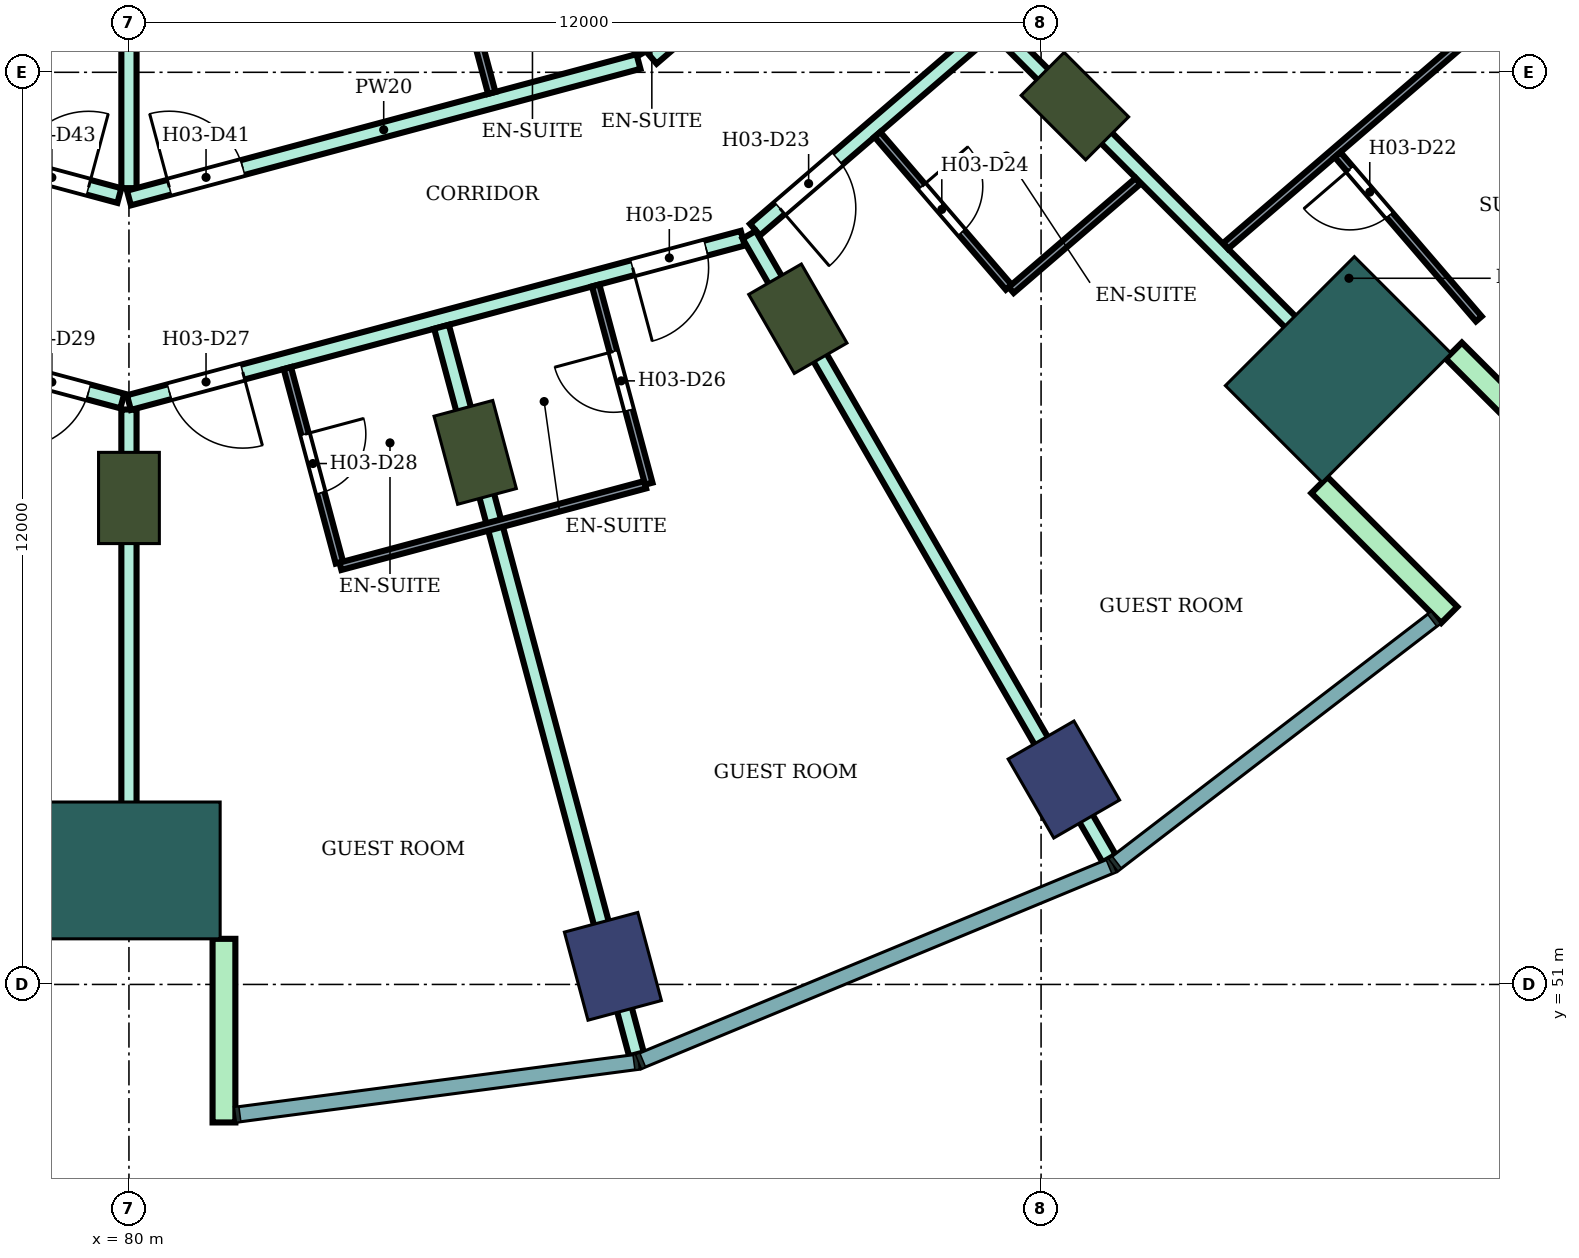
"""IFC4 building model, lengths in metres.
Left out: names, types, materials, properties, quantities, classifications, styles, units other than length and angle.
Written with IfcOpenShell. Run it as: python <this file> out.ifc"""

import sys

from ifc_helpers import new_model, si_unit, direction, frame, frame_2d, origin, origin_2d, place, context, subcontext, project, spatial, rectangle, extrude, element, fill, save


model = new_model("IFC4")
c1 = context("Model", 3, precision=1e-05, world=origin(), true_north=direction((0.0, 1.0)))
c2 = subcontext(c1, "Body", "Model", "MODEL_VIEW")
j1 = project(units=[si_unit("LENGTHUNIT", "METRE"), si_unit("PLANEANGLEUNIT", "RADIAN")], contexts=[c1])
p1 = place(None, origin())
s1 = spatial("IfcSite", under=j1, at=p1, CompositionType="ELEMENT")
p2 = place(p1, origin())
s2 = spatial("IfcBuilding", under=s1, at=p2, CompositionType="ELEMENT")
p3 = place(p2, frame((0.0, 0.0, 59.2)))
s3 = spatial("IfcBuildingStorey", under=s2, at=p3, CompositionType="ELEMENT", Elevation=59.2)
for number, where, z_axis, x_axis in (
    (1, (86.367, 51.238, 0.0), (0.0, 0.0, 1.0), (0.259, -0.966, 0.0)),
    (2, (92.3, 53.696, 0.0), (0.0, 0.0, 1.0), (0.5, -0.866, 0.0)),
):
    element("IfcColumn", number, at=place(p3, frame(where, z_axis=z_axis, x_axis=x_axis)), inside=s3, PredefinedType="COLUMN", context=c2, shape_type="SweptSolid", body=[
        extrude(rectangle(XDim=1.2, YDim=1.0, at=origin_2d()), origin(), (0.0, 0.0, 1.0), 3.8),
    ])
for number, where, z_axis, x_axis in (
    (3, (80.0, 57.4, 0.0), (0.0, 0.0, 1.0), (0.0, -1.0, 0.0)),
    (4, (84.555, 58.0, 0.0), (0.0, 0.0, 1.0), (0.259, -0.966, 0.0)),
    (5, (88.8, 59.758, 0.0), (0.0, 0.0, 1.0), (0.5, -0.866, 0.0)),
    (6, (92.445, 62.555, 0.0), (0.0, 0.0, 1.0), (0.707, -0.707, 0.0)),
):
    element("IfcColumn", number, at=place(p3, frame(where, z_axis=z_axis, x_axis=x_axis)), inside=s3, PredefinedType="COLUMN", context=c2, shape_type="SweptSolid", body=[
        extrude(rectangle(XDim=1.2, YDim=0.8, at=origin_2d()), origin(), (0.0, 0.0, 1.0), 3.8),
    ])
for number, where, z_axis, x_axis in (
    (7, (80.0, 52.5, 0.0), (0.0, 0.0, 1.0), (0.0, -1.0, 0.0)),
    (8, (95.91, 59.09, 0.0), (0.0, 0.0, 1.0), (0.707, -0.707, 0.0)),
):
    element("IfcColumn", number, at=place(p3, frame(where, z_axis=z_axis, x_axis=x_axis)), inside=s3, PredefinedType="COLUMN", context=c2, shape_type="SweptSolid", body=[
        extrude(rectangle(XDim=1.8, YDim=2.4, at=origin_2d()), origin(), (0.0, 0.0, 1.0), 3.8),
    ])
for number, where, z_axis, x_axis in (
    (9, (81.25, 51.6, 0.0), (0.0, 0.0, 1.0), (0.0, -1.0, 0.0)),
    (10, (95.662, 57.57, 0.0), (0.0, 0.0, 1.0), (0.707, -0.707, 0.0)),
    (11, (97.43, 59.338, 0.0), (0.0, 0.0, 1.0), (0.707, -0.707, 0.0)),
):
    element("IfcWall", number, at=place(p3, frame(where, z_axis=z_axis, x_axis=x_axis)), inside=s3, PredefinedType="NOTDEFINED", context=c2, shape_type="SweptSolid", body=[
        extrude(rectangle(XDim=2.416, YDim=0.3, at=frame_2d((1.208, 0.0))), origin(), (0.0, 0.0, 1.0), 3.8),
    ])
p4 = place(p3, frame((71.877, 60.831, 0.0), z_axis=(0.0, 0.0, 1.0), x_axis=(0.965852509869, -0.259092510851, 0.0)))
e12 = element("IfcWall", 12, at=p4, inside=s3, PredefinedType="PARTITIONING", context=c2, shape_type="SweptSolid", body=[
    extrude(rectangle(XDim=8.32, YDim=0.2, at=frame_2d((4.16, 0.0))), origin(), (0.0, 0.0, 1.0), 3.35),
])
p5 = place(p4, frame((6.86, 0.0, 0.0)))
e13 = element("IfcOpeningElement", 13, at=p5, cuts=e12, PredefinedType="OPENING", context=c2, shape_type="SweptSolid", body=[
    extrude(rectangle(XDim=1.0, YDim=2.1, at=frame_2d((0.5, 1.05))), frame((0.0, 0.11, 0.0), z_axis=(0.0, -1.0, 0.0), x_axis=(1.0, 0.0, 0.0)), (0.0, 0.0, 1.0), 0.22),
])
p6 = place(p4, frame((1.6, 0.0, 0.0)))
e14 = element("IfcOpeningElement", 14, at=p6, cuts=e12, PredefinedType="OPENING", context=c2, shape_type="SweptSolid", body=[
    extrude(rectangle(XDim=1.0, YDim=2.1, at=frame_2d((0.5, 1.05))), frame((0.0, 0.11, 0.0), z_axis=(0.0, -1.0, 0.0), x_axis=(1.0, 0.0, 0.0)), (0.0, 0.0, 1.0), 0.22),
])
p7 = place(p3, frame((73.297, 63.143, 0.0), z_axis=(0.0, 0.0, 1.0), x_axis=(0.965859030528, -0.25906820173, 0.0)))
e15 = element("IfcWall", 15, at=p7, inside=s3, PredefinedType="PARTITIONING", context=c2, shape_type="SweptSolid", body=[
    extrude(rectangle(XDim=6.81, YDim=0.2, at=frame_2d((3.405, 0.0))), origin(), (0.0, 0.0, 1.0), 3.35),
])
p8 = place(p7, frame((5.39, 0.0, 0.0)))
e16 = element("IfcOpeningElement", 16, at=p8, cuts=e15, PredefinedType="OPENING", context=c2, shape_type="SweptSolid", body=[
    extrude(rectangle(XDim=1.0, YDim=2.1, at=frame_2d((0.5, 1.05))), frame((0.0, 0.11, 0.0), z_axis=(0.0, -1.0, 0.0), x_axis=(1.0, 0.0, 0.0)), (0.0, 0.0, 1.0), 0.22),
])
p9 = place(p3, frame((80.0, 51.8, 0.0), z_axis=(0.0, 0.0, 1.0), x_axis=(0.0, 1.0, 0.0)))
e17 = element("IfcWall", 17, at=p9, inside=s3, PredefinedType="PARTITIONING", context=c2, shape_type="SweptSolid", body=[
    extrude(rectangle(XDim=6.764, YDim=0.2, at=frame_2d((3.382, 0.0))), origin(), (0.0, 0.0, 1.0), 3.35),
])
p10 = place(p3, frame((80.0, 58.655, 0.0), z_axis=(0.0, 0.0, 1.0), x_axis=(0.965974635626, 0.258636817424, 0.0)))
e18 = element("IfcWall", 18, at=p10, inside=s3, PredefinedType="PARTITIONING", context=c2, shape_type="SweptSolid", body=[
    extrude(rectangle(XDim=8.36, YDim=0.2, at=frame_2d((4.18, 0.0))), origin(), (0.0, 0.0, 1.0), 3.35),
])
p11 = place(p10, frame((6.86, 0.0, 0.0)))
e19 = element("IfcOpeningElement", 19, at=p11, cuts=e18, PredefinedType="OPENING", context=c2, shape_type="SweptSolid", body=[
    extrude(rectangle(XDim=1.0, YDim=2.1, at=frame_2d((0.5, 1.05))), frame((0.0, 0.11, 0.0), z_axis=(0.0, -1.0, 0.0), x_axis=(1.0, 0.0, 0.0)), (0.0, 0.0, 1.0), 0.22),
])
p12 = place(p10, frame((0.55, 0.0, 0.0)))
e20 = element("IfcOpeningElement", 20, at=p12, cuts=e18, PredefinedType="OPENING", context=c2, shape_type="SweptSolid", body=[
    extrude(rectangle(XDim=1.0, YDim=2.1, at=frame_2d((0.5, 1.05))), frame((0.0, 0.11, 0.0), z_axis=(0.0, -1.0, 0.0), x_axis=(1.0, 0.0, 0.0)), (0.0, 0.0, 1.0), 0.22),
])
p13 = place(p3, frame((80.0, 61.476, 0.0), z_axis=(0.0, 0.0, 1.0), x_axis=(0.0, 1.0, 0.0)))
e21 = element("IfcWall", 21, at=p13, inside=s3, PredefinedType="PARTITIONING", context=c2, shape_type="SweptSolid", body=[
    extrude(rectangle(XDim=5.825, YDim=0.2, at=frame_2d((2.913, 0.0))), origin(), (0.0, 0.0, 1.0), 3.35),
])
p14 = place(p3, frame((80.0, 61.346, 0.0), z_axis=(0.0, 0.0, 1.0), x_axis=(0.965924181808, 0.258825182312, 0.0)))
e22 = element("IfcWall", 22, at=p14, inside=s3, PredefinedType="PARTITIONING", context=c2, shape_type="SweptSolid", body=[
    extrude(rectangle(XDim=6.94, YDim=0.2, at=frame_2d((3.47, 0.0))), origin(), (0.0, 0.0, 1.0), 3.35),
])
p15 = place(p14, frame((0.55, 0.0, 0.0)))
e23 = element("IfcOpeningElement", 23, at=p15, cuts=e22, PredefinedType="OPENING", context=c2, shape_type="SweptSolid", body=[
    extrude(rectangle(XDim=1.0, YDim=2.1, at=frame_2d((0.5, 1.05))), frame((0.0, 0.11, 0.0), z_axis=(0.0, -1.0, 0.0), x_axis=(1.0, 0.0, 0.0)), (0.0, 0.0, 1.0), 0.22),
])
p16 = place(p3, frame((83.848, 68.332, 0.0), z_axis=(0.0, 0.0, 1.0), x_axis=(0.499901724708, -0.866082135617, 0.0)))
e24 = element("IfcWall", 24, at=p16, inside=s3, PredefinedType="PARTITIONING", context=c2, shape_type="SweptSolid", body=[
    extrude(rectangle(XDim=5.855, YDim=0.2, at=frame_2d((2.928, 0.0))), origin(), (0.0, 0.0, 1.0), 3.35),
])
p17 = place(p3, frame((84.112, 59.652, 0.0), z_axis=(0.0, 0.0, 1.0), x_axis=(0.258843225553, -0.965919346832, 0.0)))
e25 = element("IfcWall", 25, at=p17, inside=s3, PredefinedType="PARTITIONING", context=c2, shape_type="SweptSolid", body=[
    extrude(rectangle(XDim=9.909, YDim=0.2, at=frame_2d((4.955, 0.0))), origin(), (0.0, 0.0, 1.0), 3.35),
])
p18 = place(p3, frame((86.877, 63.189, 0.0), z_axis=(0.0, 0.0, 1.0), x_axis=(0.758164888471, 0.652062881853, 0.0)))
e26 = element("IfcWall", 26, at=p18, inside=s3, PredefinedType="PARTITIONING", context=c2, shape_type="SweptSolid", body=[
    extrude(rectangle(XDim=5.23, YDim=0.2, at=frame_2d((2.615, 0.0))), origin(), (0.0, 0.0, 1.0), 3.35),
])
p19 = place(p18, frame((2.63, 0.0, 0.0)))
e27 = element("IfcOpeningElement", 27, at=p19, cuts=e26, PredefinedType="OPENING", context=c2, shape_type="SweptSolid", body=[
    extrude(rectangle(XDim=1.0, YDim=2.1, at=frame_2d((0.5, 1.05))), frame((0.0, 0.11, 0.0), z_axis=(0.0, -1.0, 0.0), x_axis=(1.0, 0.0, 0.0)), (0.0, 0.0, 1.0), 0.22),
])
p20 = place(p3, frame((88.236, 60.929, 0.0), z_axis=(0.0, 0.0, 1.0), x_axis=(0.758227485202, 0.651990092474, 0.0)))
e28 = element("IfcWall", 28, at=p20, inside=s3, PredefinedType="PARTITIONING", context=c2, shape_type="SweptSolid", body=[
    extrude(rectangle(XDim=6.336, YDim=0.2, at=frame_2d((3.168, 0.0))), origin(), (0.0, 0.0, 1.0), 3.35),
])
p21 = place(p20, frame((4.757, 0.0, 0.0)))
e29 = element("IfcOpeningElement", 29, at=p21, cuts=e28, PredefinedType="OPENING", context=c2, shape_type="SweptSolid", body=[
    extrude(rectangle(XDim=1.0, YDim=2.1, at=frame_2d((0.5, 1.05))), frame((0.0, 0.11, 0.0), z_axis=(0.0, -1.0, 0.0), x_axis=(1.0, 0.0, 0.0)), (0.0, 0.0, 1.0), 0.22),
])
p22 = place(p20, frame((0.43, 0.0, 0.0)))
e30 = element("IfcOpeningElement", 30, at=p22, cuts=e28, PredefinedType="OPENING", context=c2, shape_type="SweptSolid", body=[
    extrude(rectangle(XDim=1.0, YDim=2.1, at=frame_2d((0.5, 1.05))), frame((0.0, 0.11, 0.0), z_axis=(0.0, -1.0, 0.0), x_axis=(1.0, 0.0, 0.0)), (0.0, 0.0, 1.0), 0.22),
])
p23 = place(p3, frame((88.159, 60.863, 0.0), z_axis=(0.0, 0.0, 1.0), x_axis=(0.499886028459, -0.866091195286, 0.0)))
e31 = element("IfcWall", 31, at=p23, inside=s3, PredefinedType="PARTITIONING", context=c2, shape_type="SweptSolid", body=[
    extrude(rectangle(XDim=9.475, YDim=0.2, at=frame_2d((4.737, 0.0))), origin(), (0.0, 0.0, 1.0), 3.35),
])
p24 = place(p3, frame((91.449, 63.548, 0.0), z_axis=(0.0, 0.0, 1.0), x_axis=(0.706984810649, -0.707228730688, 0.0)))
e32 = element("IfcWall", 32, at=p24, inside=s3, PredefinedType="PARTITIONING", context=c2, shape_type="SweptSolid", body=[
    extrude(rectangle(XDim=7.006, YDim=0.2, at=frame_2d((3.503, 0.0))), origin(), (0.0, 0.0, 1.0), 3.35),
])
p25 = place(p3, frame((82.084, 59.108, 0.0), z_axis=(0.0, 0.0, 1.0), x_axis=(0.258591746437, -0.965986702121, 0.0)))
e33 = element("IfcWall", 33, at=p25, inside=s3, PredefinedType="PARTITIONING", context=c2, shape_type="SweptSolid", body=[
    extrude(rectangle(XDim=2.649, YDim=0.1, at=frame_2d((1.325, 0.0))), origin(), (0.0, 0.0, 1.0), 3.35),
])
p26 = place(p25, frame((0.9, 0.0, 0.0)))
e34 = element("IfcOpeningElement", 34, at=p26, cuts=e33, PredefinedType="OPENING", context=c2, shape_type="SweptSolid", body=[
    extrude(rectangle(XDim=0.8, YDim=2.1, at=frame_2d((0.4, 1.05))), frame((0.0, 0.06, 0.0), z_axis=(0.0, -1.0, 0.0), x_axis=(1.0, 0.0, 0.0)), (0.0, 0.0, 1.0), 0.12),
])
p27 = place(p3, frame((82.782, 56.501, 0.0), z_axis=(0.0, 0.0, 1.0), x_axis=(0.965999228418, 0.258544949083, 0.0)))
e35 = element("IfcWall", 35, at=p27, inside=s3, PredefinedType="PARTITIONING", context=c2, shape_type="SweptSolid", body=[
    extrude(rectangle(XDim=4.15, YDim=0.1, at=frame_2d((2.075, 0.0))), origin(), (0.0, 0.0, 1.0), 3.35),
])
p28 = place(p3, frame((84.087, 65.289, 0.0), z_axis=(0.0, 0.0, 1.0), x_axis=(0.258929459649, -0.965896234037, 0.0)))
e36 = element("IfcWall", 36, at=p28, inside=s3, PredefinedType="PARTITIONING", context=c2, shape_type="SweptSolid", body=[
    extrude(rectangle(XDim=2.65, YDim=0.1, at=frame_2d((1.325, 0.0))), origin(), (0.0, 0.0, 1.0), 3.35),
])
p29 = place(p28, frame((0.95, 0.0, 0.0)))
e37 = element("IfcOpeningElement", 37, at=p29, cuts=e36, PredefinedType="OPENING", context=c2, shape_type="SweptSolid", body=[
    extrude(rectangle(XDim=0.8, YDim=2.1, at=frame_2d((0.4, 1.05))), frame((0.0, 0.06, 0.0), z_axis=(0.0, -1.0, 0.0), x_axis=(1.0, 0.0, 0.0)), (0.0, 0.0, 1.0), 0.12),
])
p30 = place(p3, frame((86.14, 60.196, 0.0), z_axis=(0.0, 0.0, 1.0), x_axis=(0.258945475746, -0.965891940432, 0.0)))
e38 = element("IfcWall", 38, at=p30, inside=s3, PredefinedType="PARTITIONING", context=c2, shape_type="SweptSolid", body=[
    extrude(rectangle(XDim=2.7, YDim=0.1, at=frame_2d((1.35, 0.0))), origin(), (0.0, 0.0, 1.0), 3.35),
])
p31 = place(p30, frame((0.9, 0.0, 0.0)))
e39 = element("IfcOpeningElement", 39, at=p31, cuts=e38, PredefinedType="OPENING", context=c2, shape_type="SweptSolid", body=[
    extrude(rectangle(XDim=0.8, YDim=2.1, at=frame_2d((0.4, 1.05))), frame((0.0, 0.06, 0.0), z_axis=(0.0, -1.0, 0.0), x_axis=(1.0, 0.0, 0.0)), (0.0, 0.0, 1.0), 0.12),
])
p32 = place(p3, frame((89.846, 62.182, 0.0), z_axis=(0.0, 0.0, 1.0), x_axis=(0.652095405055, -0.758136915541, 0.0)))
e40 = element("IfcWall", 40, at=p32, inside=s3, PredefinedType="PARTITIONING", context=c2, shape_type="SweptSolid", body=[
    extrude(rectangle(XDim=2.65, YDim=0.1, at=frame_2d((1.325, 0.0))), origin(), (0.0, 0.0, 1.0), 3.35),
])
p33 = place(p32, frame((0.9, 0.0, 0.0)))
e41 = element("IfcOpeningElement", 41, at=p33, cuts=e40, PredefinedType="OPENING", context=c2, shape_type="SweptSolid", body=[
    extrude(rectangle(XDim=0.8, YDim=2.1, at=frame_2d((0.4, 1.05))), frame((0.0, 0.06, 0.0), z_axis=(0.0, -1.0, 0.0), x_axis=(1.0, 0.0, 0.0)), (0.0, 0.0, 1.0), 0.12),
])
p34 = place(p3, frame((91.607, 60.135, 0.0), z_axis=(0.0, 0.0, 1.0), x_axis=(0.758135842672, 0.652096652388, 0.0)))
e42 = element("IfcWall", 42, at=p34, inside=s3, PredefinedType="PARTITIONING", context=c2, shape_type="SweptSolid", body=[
    extrude(rectangle(XDim=2.201, YDim=0.1, at=frame_2d((1.101, 0.0))), origin(), (0.0, 0.0, 1.0), 3.35),
])
p35 = place(p3, frame((94.428, 60.715, 0.0), z_axis=(0.0, 0.0, 1.0), x_axis=(0.758117248367, 0.65211826974, 0.0)))
e43 = element("IfcWall", 43, at=p35, inside=s3, PredefinedType="PARTITIONING", context=c2, shape_type="SweptSolid", body=[
    extrude(rectangle(XDim=9.024, YDim=0.1, at=frame_2d((4.512, 0.0))), origin(), (0.0, 0.0, 1.0), 3.35),
])
p36 = place(p35, frame((5.002, 0.0, 0.0)))
e44 = element("IfcOpeningElement", 44, at=p36, cuts=e43, PredefinedType="OPENING", context=c2, shape_type="SweptSolid", body=[
    extrude(rectangle(XDim=0.9, YDim=2.1, at=frame_2d((0.45, 1.05))), frame((0.0, 0.06, 0.0), z_axis=(0.0, -1.0, 0.0), x_axis=(1.0, 0.0, 0.0)), (0.0, 0.0, 1.0), 0.12),
])
p37 = place(p3, frame((95.901, 61.916, 0.0), z_axis=(0.0, 0.0, 1.0), x_axis=(0.652215581117, -0.758033532074, 0.0)))
e45 = element("IfcWall", 45, at=p37, inside=s3, PredefinedType="PARTITIONING", context=c2, shape_type="SweptSolid", body=[
    extrude(rectangle(XDim=2.849, YDim=0.1, at=frame_2d((1.425, 0.0))), origin(), (0.0, 0.0, 1.0), 3.35),
])
p38 = place(p37, frame((0.25, 0.0, 0.0)))
e46 = element("IfcOpeningElement", 46, at=p38, cuts=e45, PredefinedType="OPENING", context=c2, shape_type="SweptSolid", body=[
    extrude(rectangle(XDim=0.8, YDim=2.1, at=frame_2d((0.4, 1.05))), frame((0.0, 0.06, 0.0), z_axis=(0.0, -1.0, 0.0), x_axis=(1.0, 0.0, 0.0)), (0.0, 0.0, 1.0), 0.12),
])
p39 = place(p38, frame((0.8, 0.0, 0.0), z_axis=(0.0, 0.0, 1.0), x_axis=(-1.0, 0.0, 0.0)))
e47 = element("IfcDoor", 47, at=p39, inside=s3, OperationType="SINGLE_SWING_RIGHT", PredefinedType="DOOR", context=c2, shape_type="SweptSolid", body=[
    extrude(rectangle(XDim=0.8, YDim=2.1, at=frame_2d((0.4, 1.05))), frame((0.0, 0.025, 0.0), z_axis=(0.0, -1.0, 0.0), x_axis=(1.0, 0.0, 0.0)), (0.0, 0.0, 1.0), 0.05),
])
fill(e46, e47)
p40 = place(p22, frame((1.0, 0.0, 0.0), z_axis=(0.0, 0.0, 1.0), x_axis=(-1.0, 0.0, 0.0)))
e48 = element("IfcDoor", 48, at=p40, inside=s3, OperationType="SINGLE_SWING_RIGHT", PredefinedType="DOOR", context=c2, shape_type="SweptSolid", body=[
    extrude(rectangle(XDim=1.0, YDim=2.1, at=frame_2d((0.5, 1.05))), frame((0.0, 0.025, 0.0), z_axis=(0.0, -1.0, 0.0), x_axis=(1.0, 0.0, 0.0)), (0.0, 0.0, 1.0), 0.05),
])
fill(e30, e48)
p41 = place(p33, origin())
e49 = element("IfcDoor", 49, at=p41, inside=s3, OperationType="SINGLE_SWING_LEFT", PredefinedType="DOOR", context=c2, shape_type="SweptSolid", body=[
    extrude(rectangle(XDim=0.8, YDim=2.1, at=frame_2d((0.4, 1.05))), frame((0.0, 0.025, 0.0), z_axis=(0.0, -1.0, 0.0), x_axis=(1.0, 0.0, 0.0)), (0.0, 0.0, 1.0), 0.05),
])
fill(e41, e49)
p42 = place(p11, frame((1.0, 0.0, 0.0), z_axis=(0.0, 0.0, 1.0), x_axis=(-1.0, 0.0, 0.0)))
e50 = element("IfcDoor", 50, at=p42, inside=s3, OperationType="SINGLE_SWING_RIGHT", PredefinedType="DOOR", context=c2, shape_type="SweptSolid", body=[
    extrude(rectangle(XDim=1.0, YDim=2.1, at=frame_2d((0.5, 1.05))), frame((0.0, 0.025, 0.0), z_axis=(0.0, -1.0, 0.0), x_axis=(1.0, 0.0, 0.0)), (0.0, 0.0, 1.0), 0.05),
])
fill(e19, e50)
p43 = place(p31, frame((0.8, 0.0, 0.0), z_axis=(0.0, 0.0, 1.0), x_axis=(-1.0, 0.0, 0.0)))
e51 = element("IfcDoor", 51, at=p43, inside=s3, OperationType="SINGLE_SWING_RIGHT", PredefinedType="DOOR", context=c2, shape_type="SweptSolid", body=[
    extrude(rectangle(XDim=0.8, YDim=2.1, at=frame_2d((0.4, 1.05))), frame((0.0, 0.025, 0.0), z_axis=(0.0, -1.0, 0.0), x_axis=(1.0, 0.0, 0.0)), (0.0, 0.0, 1.0), 0.05),
])
fill(e39, e51)
p44 = place(p12, frame((1.0, 0.0, 0.0), z_axis=(0.0, 0.0, 1.0), x_axis=(-1.0, 0.0, 0.0)))
e52 = element("IfcDoor", 52, at=p44, inside=s3, OperationType="SINGLE_SWING_LEFT", PredefinedType="DOOR", context=c2, shape_type="SweptSolid", body=[
    extrude(rectangle(XDim=1.0, YDim=2.1, at=frame_2d((0.5, 1.05))), frame((0.0, 0.025, 0.0), z_axis=(0.0, -1.0, 0.0), x_axis=(1.0, 0.0, 0.0)), (0.0, 0.0, 1.0), 0.05),
])
fill(e20, e52)
p45 = place(p26, origin())
e53 = element("IfcDoor", 53, at=p45, inside=s3, OperationType="SINGLE_SWING_LEFT", PredefinedType="DOOR", context=c2, shape_type="SweptSolid", body=[
    extrude(rectangle(XDim=0.8, YDim=2.1, at=frame_2d((0.4, 1.05))), frame((0.0, 0.025, 0.0), z_axis=(0.0, -1.0, 0.0), x_axis=(1.0, 0.0, 0.0)), (0.0, 0.0, 1.0), 0.05),
])
fill(e34, e53)
p46 = place(p5, frame((1.0, 0.0, 0.0), z_axis=(0.0, 0.0, 1.0), x_axis=(-1.0, 0.0, 0.0)))
e54 = element("IfcDoor", 54, at=p46, inside=s3, OperationType="SINGLE_SWING_RIGHT", PredefinedType="DOOR", context=c2, shape_type="SweptSolid", body=[
    extrude(rectangle(XDim=1.0, YDim=2.1, at=frame_2d((0.5, 1.05))), frame((0.0, 0.025, 0.0), z_axis=(0.0, -1.0, 0.0), x_axis=(1.0, 0.0, 0.0)), (0.0, 0.0, 1.0), 0.05),
])
fill(e13, e54)
p47 = place(p15, origin())
e55 = element("IfcDoor", 55, at=p47, inside=s3, OperationType="SINGLE_SWING_LEFT", PredefinedType="DOOR", context=c2, shape_type="SweptSolid", body=[
    extrude(rectangle(XDim=1.0, YDim=2.1, at=frame_2d((0.5, 1.05))), frame((0.0, 0.025, 0.0), z_axis=(0.0, -1.0, 0.0), x_axis=(1.0, 0.0, 0.0)), (0.0, 0.0, 1.0), 0.05),
])
fill(e23, e55)
p48 = place(p8, origin())
e56 = element("IfcDoor", 56, at=p48, inside=s3, OperationType="SINGLE_SWING_RIGHT", PredefinedType="DOOR", context=c2, shape_type="SweptSolid", body=[
    extrude(rectangle(XDim=1.0, YDim=2.1, at=frame_2d((0.5, 1.05))), frame((0.0, 0.025, 0.0), z_axis=(0.0, -1.0, 0.0), x_axis=(1.0, 0.0, 0.0)), (0.0, 0.0, 1.0), 0.05),
])
fill(e16, e56)
save(model, sys.argv[1])
